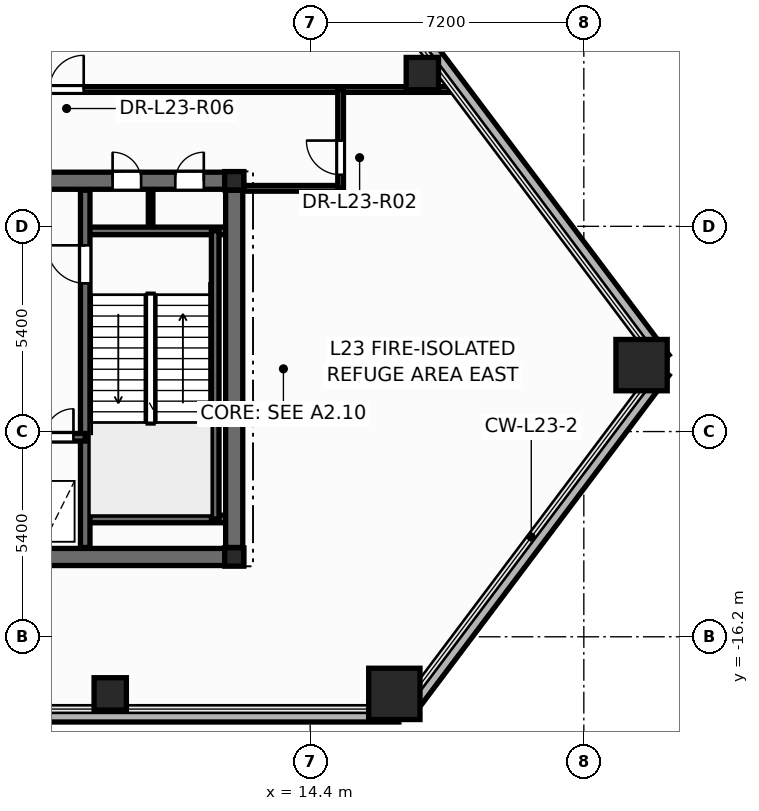
"""IFC4 building model, lengths in metres.
Left out: names, types, materials, properties, quantities, classifications, styles, units other than length and angle.
Written with IfcOpenShell. Run it as: python <this file> out.ifc"""

import sys

from ifc_helpers import new_model, si_unit, direction, frame, frame_2d, origin, origin_2d, place, context, subcontext, project, spatial, rectangle, hollow_rectangle, hollow_circle, i_section, extrude, element, fill, save


model = new_model("IFC4")
c1 = context("Model", 3, precision=1e-05, world=origin(), true_north=direction((0.0, 1.0)))
c2 = subcontext(c1, "Body", "Model", "MODEL_VIEW")
j1 = project(units=[si_unit("LENGTHUNIT", "METRE"), si_unit("PLANEANGLEUNIT", "RADIAN")], contexts=[c1])
p1 = place(None, origin())
s1 = spatial("IfcSite", under=j1, at=p1, CompositionType="ELEMENT")
p2 = place(p1, origin())
s2 = spatial("IfcBuilding", under=s1, at=p2, CompositionType="ELEMENT")
p3 = place(p2, frame((0.0, 0.0, 90.0)))
s3 = spatial("IfcBuildingStorey", under=s2, at=p3, CompositionType="ELEMENT", Elevation=90.0)
for number, where, z_axis, x_axis in (
    (1, (16.614, -17.702, 0.0), (0.0, 0.0, 1.0), (1.0, 0.0, 0.0)),
    (2, (23.119, -9.052, 0.0), (0.0, 0.0, 1.0), (1.0, 0.0, 0.0)),
):
    element("IfcColumn", number, at=place(p3, frame(where, z_axis=z_axis, x_axis=x_axis)), inside=s3, PredefinedType="COLUMN", context=c2, shape_type="SweptSolid", body=[
        extrude(hollow_rectangle(XDim=1.35, YDim=1.35, WallThickness=0.065, at=origin_2d()), origin(), (0.0, 0.0, 1.0), 4.8),
    ])
for number, where, z_axis, x_axis in (
    (3, (9.138, -17.702, 0.0), (0.0, 0.0, 1.0), (1.0, 0.0, 0.0)),
    (4, (17.351, -1.381, 0.0), (0.0, 0.0, 1.0), (1.0, 0.0, 0.0)),
):
    element("IfcColumn", number, at=place(p3, frame(where, z_axis=z_axis, x_axis=x_axis)), inside=s3, PredefinedType="COLUMN", context=c2, shape_type="SweptSolid", body=[
        extrude(hollow_circle(Radius=0.425, WallThickness=0.038, at=origin_2d()), origin(), (0.0, 0.0, 1.0), 4.8),
    ])
for number, where, z_axis, x_axis in (
    (5, (12.4, -14.1, 0.0), (0.0, 0.0, 1.0), (1.0, 0.0, 0.0)),
    (6, (12.4, -4.2, 0.0), (0.0, 0.0, 1.0), (1.0, 0.0, 0.0)),
):
    element("IfcColumn", number, at=place(p3, frame(where, z_axis=z_axis, x_axis=x_axis)), inside=s3, PredefinedType="COLUMN", context=c2, shape_type="SweptSolid", body=[
        extrude(i_section(OverallWidth=0.5, OverallDepth=0.482, WebThickness=0.04, FlangeThickness=0.045, at=origin_2d()), origin(), (0.0, 0.0, 1.0), 4.8),
    ])
p4 = place(p3, frame((-16.733, -18.262, -0.2), z_axis=(0.0, 0.0, 1.0), x_axis=(1.0, 0.0, 0.0)))
e7 = element("IfcWall", 7, at=p4, inside=s3, PredefinedType="PARAPET", context=c2, shape_type="SweptSolid", body=[
    extrude(rectangle(XDim=33.467, YDim=0.36, at=frame_2d((16.733, 0.0))), origin(), (0.0, 0.0, 1.0), 0.38),
])
p5 = place(p3, frame((16.99, -18.135, -0.2), z_axis=(0.0, 0.0, 1.0), x_axis=(0.601045658487, 0.799214687311, 0.0)))
e8 = element("IfcWall", 8, at=p5, inside=s3, PredefinedType="PARAPET", context=c2, shape_type="SweptSolid", body=[
    extrude(rectangle(XDim=11.164, YDim=0.36, at=frame_2d((5.582, 0.0))), origin(), (0.0, 0.0, 1.0), 0.38),
])
p6 = place(p3, frame((23.7, -8.892, -0.2), z_axis=(0.0, 0.0, 1.0), x_axis=(-0.601043466881, 0.799216335493, 0.0)))
e9 = element("IfcWall", 9, at=p6, inside=s3, PredefinedType="PARAPET", context=c2, shape_type="SweptSolid", body=[
    extrude(rectangle(XDim=27.763, YDim=0.36, at=frame_2d((13.882, 0.0))), origin(), (0.0, 0.0, 1.0), 0.38),
])
p7 = place(p3, frame((10.2, -5.52, 0.0), z_axis=(0.0, 0.0, 1.0), x_axis=(0.0, 1.0, 0.0)))
e10 = element("IfcWall", 10, at=p7, inside=s3, PredefinedType="PARTITIONING", context=c2, shape_type="SweptSolid", body=[
    extrude(rectangle(XDim=1.12, YDim=0.12, at=frame_2d((0.56, 0.0))), origin(), (0.0, 0.0, 1.0), 4.52),
])
p8 = place(p3, frame((-12.65, -14.1, 0.0), z_axis=(0.0, 0.0, 1.0), x_axis=(1.0, 0.0, 0.0)))
e11 = element("IfcWall", 11, at=p8, inside=s3, PredefinedType="SHEAR", context=c2, shape_type="SweptSolid", body=[
    extrude(rectangle(XDim=25.3, YDim=0.45, at=frame_2d((12.65, 0.0))), origin(), (0.0, 0.0, 1.0), 4.8),
])
p9 = place(p3, frame((-12.65, -4.2, 0.0), z_axis=(0.0, 0.0, 1.0), x_axis=(1.0, 0.0, 0.0)))
e12 = element("IfcWall", 12, at=p9, inside=s3, PredefinedType="SHEAR", context=c2, shape_type="SweptSolid", body=[
    extrude(rectangle(XDim=25.3, YDim=0.45, at=frame_2d((12.65, 0.0))), origin(), (0.0, 0.0, 1.0), 4.8),
])
p10 = place(p9, frame((0.95, 0.0, 0.0)))
e13 = element("IfcOpeningElement", 13, at=p10, cuts=e12, PredefinedType="OPENING", context=c2, shape_type="SweptSolid", body=[
    extrude(rectangle(XDim=0.756, YDim=2.054, at=frame_2d((0.375, 1.027))), frame((0.0, 0.235, 0.0), z_axis=(0.0, -1.0, 0.0), x_axis=(1.0, 0.0, 0.0)), (0.0, 0.0, 1.0), 0.47),
])
p11 = place(p9, frame((2.6, 0.0, 0.0)))
e14 = element("IfcOpeningElement", 14, at=p11, cuts=e12, PredefinedType="OPENING", context=c2, shape_type="SweptSolid", body=[
    extrude(rectangle(XDim=0.756, YDim=2.054, at=frame_2d((0.375, 1.027))), frame((0.0, 0.235, 0.0), z_axis=(0.0, -1.0, 0.0), x_axis=(1.0, 0.0, 0.0)), (0.0, 0.0, 1.0), 0.47),
])
p12 = place(p9, frame((21.85, 0.0, 0.0)))
e15 = element("IfcOpeningElement", 15, at=p12, cuts=e12, PredefinedType="OPENING", context=c2, shape_type="SweptSolid", body=[
    extrude(rectangle(XDim=0.756, YDim=2.054, at=frame_2d((0.375, 1.027))), frame((0.0, 0.235, 0.0), z_axis=(0.0, -1.0, 0.0), x_axis=(1.0, 0.0, 0.0)), (0.0, 0.0, 1.0), 0.47),
])
p13 = place(p9, frame((23.5, 0.0, 0.0)))
e16 = element("IfcOpeningElement", 16, at=p13, cuts=e12, PredefinedType="OPENING", context=c2, shape_type="SweptSolid", body=[
    extrude(rectangle(XDim=0.756, YDim=2.054, at=frame_2d((0.375, 1.027))), frame((0.0, 0.235, 0.0), z_axis=(0.0, -1.0, 0.0), x_axis=(1.0, 0.0, 0.0)), (0.0, 0.0, 1.0), 0.47),
])
p14 = place(p9, frame((5.85, 0.0, 0.0)))
e17 = element("IfcOpeningElement", 17, at=p14, cuts=e12, PredefinedType="OPENING", context=c2, shape_type="SweptSolid", body=[
    extrude(rectangle(XDim=1.006, YDim=2.104, at=frame_2d((0.5, 1.052))), frame((0.0, 0.235, 0.0), z_axis=(0.0, -1.0, 0.0), x_axis=(1.0, 0.0, 0.0)), (0.0, 0.0, 1.0), 0.47),
])
p15 = place(p9, frame((10.35, 0.0, 0.0)))
e18 = element("IfcOpeningElement", 18, at=p15, cuts=e12, PredefinedType="OPENING", context=c2, shape_type="SweptSolid", body=[
    extrude(rectangle(XDim=1.406, YDim=2.154, at=frame_2d((0.7, 1.077))), frame((0.0, 0.235, 0.0), z_axis=(0.0, -1.0, 0.0), x_axis=(1.0, 0.0, 0.0)), (0.0, 0.0, 1.0), 0.47),
])
p16 = place(p9, frame((18.45, 0.0, 0.0)))
e19 = element("IfcOpeningElement", 19, at=p16, cuts=e12, PredefinedType="OPENING", context=c2, shape_type="SweptSolid", body=[
    extrude(rectangle(XDim=1.006, YDim=2.104, at=frame_2d((0.5, 1.052))), frame((0.0, 0.235, 0.0), z_axis=(0.0, -1.0, 0.0), x_axis=(1.0, 0.0, 0.0)), (0.0, 0.0, 1.0), 0.47),
])
for number, where, z_axis, x_axis in (
    (20, (8.48, -5.52, 0.0), (0.0, 0.0, 1.0), (1.0, 0.0, 0.0)),
    (21, (8.48, -13.1, 0.0), (0.0, 0.0, 1.0), (1.0, 0.0, 0.0)),
):
    element("IfcWall", number, at=place(p3, frame(where, z_axis=z_axis, x_axis=x_axis)), inside=s3, PredefinedType="SOLIDWALL", context=c2, shape_type="SweptSolid", body=[
        extrude(rectangle(XDim=3.87, YDim=0.2, at=frame_2d((1.935, 0.0))), origin(), (0.0, 0.0, 1.0), 4.8),
    ])
p17 = place(p3, frame((11.9, -13.1, 0.0), z_axis=(0.0, 0.0, 1.0), x_axis=(0.0, 1.0, 0.0)))
e22 = element("IfcWall", 22, at=p17, inside=s3, PredefinedType="SOLIDWALL", context=c2, shape_type="SweptSolid", body=[
    extrude(rectangle(XDim=7.58, YDim=0.2, at=frame_2d((3.79, 0.0))), origin(), (0.0, 0.0, 1.0), 4.8),
])
p18 = place(p3, frame((8.48, -13.85, 0.0), z_axis=(0.0, 0.0, 1.0), x_axis=(0.0, 1.0, 0.0)))
e23 = element("IfcWall", 23, at=p18, inside=s3, PredefinedType="SHEAR", context=c2, shape_type="SweptSolid", body=[
    extrude(rectangle(XDim=9.4, YDim=0.25, at=frame_2d((4.7, 0.0))), origin(), (0.0, 0.0, 1.0), 4.8),
])
p19 = place(p18, frame((6.95, 0.0, 0.0)))
e24 = element("IfcOpeningElement", 24, at=p19, cuts=e23, PredefinedType="OPENING", context=c2, shape_type="SweptSolid", body=[
    extrude(rectangle(XDim=1.006, YDim=2.104, at=frame_2d((0.5, 1.052))), frame((0.0, 0.135, 0.0), z_axis=(0.0, -1.0, 0.0), x_axis=(1.0, 0.0, 0.0)), (0.0, 0.0, 1.0), 0.27),
])
p20 = place(p3, frame((5.12, -10.95, 0.0), z_axis=(0.0, 0.0, 1.0), x_axis=(1.0, 0.0, 0.0)))
e25 = element("IfcWall", 25, at=p20, inside=s3, PredefinedType="SOLIDWALL", context=c2, shape_type="SweptSolid", body=[
    extrude(rectangle(XDim=3.36, YDim=0.2, at=frame_2d((1.68, 0.0))), origin(), (0.0, 0.0, 1.0), 4.8),
])
p21 = place(p20, frame((0.42, 0.0, 0.0)))
e26 = element("IfcOpeningElement", 26, at=p21, cuts=e25, PredefinedType="OPENING", context=c2, shape_type="SweptSolid", body=[
    extrude(rectangle(XDim=1.106, YDim=2.104, at=frame_2d((0.55, 1.052))), frame((0.0, 0.11, 0.0), z_axis=(0.0, -1.0, 0.0), x_axis=(1.0, 0.0, 0.0)), (0.0, 0.0, 1.0), 0.22),
])
p22 = place(p20, frame((2.3, 0.0, 0.0)))
e27 = element("IfcOpeningElement", 27, at=p22, cuts=e25, PredefinedType="OPENING", context=c2, shape_type="SweptSolid", body=[
    extrude(rectangle(XDim=0.756, YDim=2.054, at=frame_2d((0.375, 1.027))), frame((0.0, 0.11, 0.0), z_axis=(0.0, -1.0, 0.0), x_axis=(1.0, 0.0, 0.0)), (0.0, 0.0, 1.0), 0.22),
])
p23 = place(p3, frame((12.4, -13.85, 0.0), z_axis=(0.0, 0.0, 1.0), x_axis=(0.0, 1.0, 0.0)))
e28 = element("IfcWall", 28, at=p23, inside=s3, PredefinedType="SHEAR", context=c2, shape_type="SweptSolid", body=[
    extrude(rectangle(XDim=9.4, YDim=0.45, at=frame_2d((4.7, 0.0))), origin(), (0.0, 0.0, 1.0), 4.8),
])
p24 = place(p3, frame((7.14, -1.8, 0.0), z_axis=(0.0, 0.0, 1.0), x_axis=(1.0, 0.0, 0.0)))
e29 = element("IfcWall", 29, at=p24, inside=s3, PredefinedType="PARTITIONING", context=c2, shape_type="SweptSolid", body=[
    extrude(rectangle(XDim=8.06, YDim=0.15, at=frame_2d((4.03, 0.0))), origin(), (0.0, 0.0, 1.0), 2.485),
])
p25 = place(p24, frame((0.4, 0.0, 0.0)))
e30 = element("IfcOpeningElement", 30, at=p25, cuts=e29, PredefinedType="OPENING", context=c2, shape_type="SweptSolid", body=[
    extrude(rectangle(XDim=0.906, YDim=2.104, at=frame_2d((0.45, 1.052))), frame((0.0, 0.085, 0.0), z_axis=(0.0, -1.0, 0.0), x_axis=(1.0, 0.0, 0.0)), (0.0, 0.0, 1.0), 0.17),
])
p26 = place(p3, frame((15.2, -1.8, 0.0), z_axis=(0.0, 0.0, 1.0), x_axis=(1.0, 0.0, 0.0)))
e31 = element("IfcWall", 31, at=p26, inside=s3, PredefinedType="PARTITIONING", context=c2, shape_type="SweptSolid", body=[
    extrude(rectangle(XDim=2.967, YDim=0.15, at=frame_2d((1.483, 0.0))), origin(), (0.0, 0.0, 1.0), 2.585),
])
p27 = place(p3, frame((12.652, -4.4, 0.0), z_axis=(0.0, 0.0, 1.0), x_axis=(1.0, 0.0, 0.0)))
e32 = element("IfcWall", 32, at=p27, inside=s3, PredefinedType="PARTITIONING", context=c2, shape_type="SweptSolid", body=[
    extrude(rectangle(XDim=2.548, YDim=0.15, at=frame_2d((1.274, 0.0))), origin(), (0.0, 0.0, 1.0), 3.495),
])
p28 = place(p3, frame((15.2, -4.4, 0.0), z_axis=(0.0, 0.0, 1.0), x_axis=(0.0, 1.0, 0.0)))
e33 = element("IfcWall", 33, at=p28, inside=s3, PredefinedType="PARTITIONING", context=c2, shape_type="SweptSolid", body=[
    extrude(rectangle(XDim=2.6, YDim=0.15, at=frame_2d((1.3, 0.0))), origin(), (0.0, 0.0, 1.0), 2.485),
])
p29 = place(p28, frame((0.357, 0.0, 0.0)))
e34 = element("IfcOpeningElement", 34, at=p29, cuts=e33, PredefinedType="OPENING", context=c2, shape_type="SweptSolid", body=[
    extrude(rectangle(XDim=0.906, YDim=2.104, at=frame_2d((0.45, 1.052))), frame((0.0, 0.085, 0.0), z_axis=(0.0, -1.0, 0.0), x_axis=(1.0, 0.0, 0.0)), (0.0, 0.0, 1.0), 0.17),
])
p30 = place(p19, origin())
e35 = element("IfcDoor", 35, at=p30, inside=s3, OperationType="SINGLE_SWING_RIGHT", PredefinedType="DOOR", context=c2, shape_type="SweptSolid", body=[
    extrude(rectangle(XDim=1.0, YDim=2.1, at=frame_2d((0.5, 1.05))), frame((0.0, 0.025, 0.0), z_axis=(0.0, -1.0, 0.0), x_axis=(1.0, 0.0, 0.0)), (0.0, 0.0, 1.0), 0.05),
])
fill(e24, e35)
p31 = place(p22, origin())
e36 = element("IfcDoor", 36, at=p31, inside=s3, OperationType="SINGLE_SWING_RIGHT", PredefinedType="DOOR", context=c2, shape_type="SweptSolid", body=[
    extrude(rectangle(XDim=0.75, YDim=2.05, at=frame_2d((0.375, 1.025))), frame((0.0, 0.025, 0.0), z_axis=(0.0, -1.0, 0.0), x_axis=(1.0, 0.0, 0.0)), (0.0, 0.0, 1.0), 0.05),
])
fill(e27, e36)
p32 = place(p12, origin())
e37 = element("IfcDoor", 37, at=p32, inside=s3, OperationType="SINGLE_SWING_LEFT", PredefinedType="DOOR", context=c2, shape_type="SweptSolid", body=[
    extrude(rectangle(XDim=0.75, YDim=2.05, at=frame_2d((0.375, 1.025))), frame((0.0, 0.025, 0.0), z_axis=(0.0, -1.0, 0.0), x_axis=(1.0, 0.0, 0.0)), (0.0, 0.0, 1.0), 0.05),
])
fill(e15, e37)
p33 = place(p13, origin())
e38 = element("IfcDoor", 38, at=p33, inside=s3, OperationType="SINGLE_SWING_RIGHT", PredefinedType="DOOR", context=c2, shape_type="SweptSolid", body=[
    extrude(rectangle(XDim=0.75, YDim=2.05, at=frame_2d((0.375, 1.025))), frame((0.0, 0.025, 0.0), z_axis=(0.0, -1.0, 0.0), x_axis=(1.0, 0.0, 0.0)), (0.0, 0.0, 1.0), 0.05),
])
fill(e16, e38)
p34 = place(p29, origin())
e39 = element("IfcDoor", 39, at=p34, inside=s3, OperationType="SINGLE_SWING_RIGHT", PredefinedType="DOOR", context=c2, shape_type="SweptSolid", body=[
    extrude(rectangle(XDim=0.9, YDim=2.1, at=frame_2d((0.45, 1.05))), frame((0.0, 0.025, 0.0), z_axis=(0.0, -1.0, 0.0), x_axis=(1.0, 0.0, 0.0)), (0.0, 0.0, 1.0), 0.05),
])
fill(e34, e39)
p35 = place(p25, origin())
e40 = element("IfcDoor", 40, at=p35, inside=s3, OperationType="SINGLE_SWING_RIGHT", PredefinedType="DOOR", context=c2, shape_type="SweptSolid", body=[
    extrude(rectangle(XDim=0.9, YDim=2.1, at=frame_2d((0.45, 1.05))), frame((0.0, 0.025, 0.0), z_axis=(0.0, -1.0, 0.0), x_axis=(1.0, 0.0, 0.0)), (0.0, 0.0, 1.0), 0.05),
])
fill(e30, e40)
save(model, sys.argv[1])
